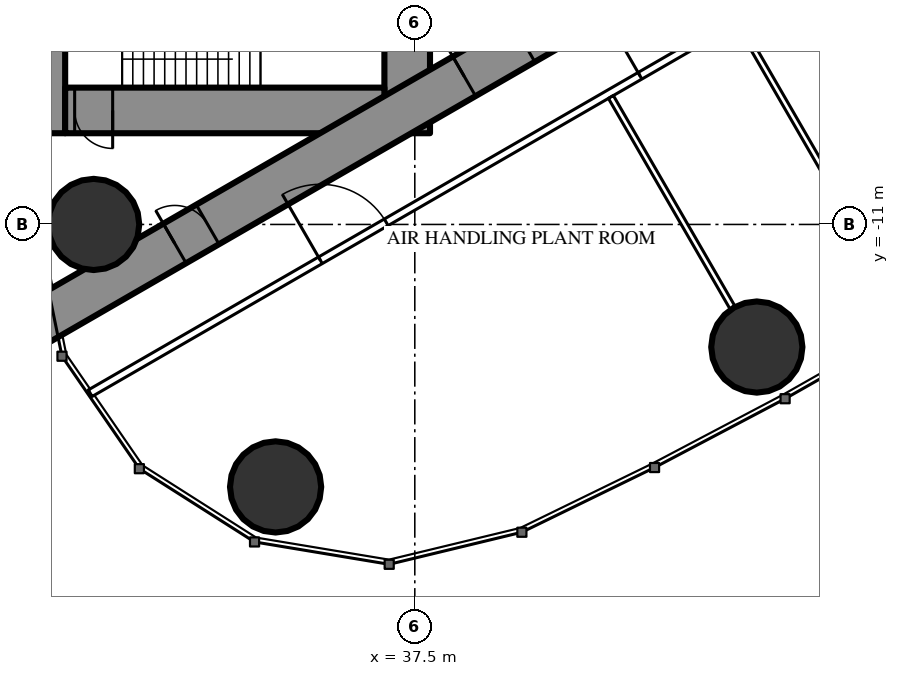
"""IFC4 building model, lengths in metres.
Left out: names, types, materials, properties, quantities, classifications, styles, units other than length and angle.
Written with IfcOpenShell. Run it as: python <this file> out.ifc"""

import sys

from ifc_helpers import new_model, si_unit, direction, frame, frame_2d, origin, origin_2d, place, context, subcontext, project, spatial, rectangle, circle, extrude, element, fill, save


model = new_model("IFC4")
c1 = context("Model", 3, precision=1e-05, world=origin(), true_north=direction((0.0, 1.0)))
c2 = subcontext(c1, "Body", "Model", "MODEL_VIEW")
j1 = project(units=[si_unit("LENGTHUNIT", "METRE"), si_unit("PLANEANGLEUNIT", "RADIAN")], contexts=[c1])
p1 = place(None, origin())
s1 = spatial("IfcSite", under=j1, at=p1, CompositionType="ELEMENT")
p2 = place(p1, origin())
s2 = spatial("IfcBuilding", under=s1, at=p2, CompositionType="ELEMENT")
p3 = place(p2, frame((0.0, 0.0, 263.3)))
s3 = spatial("IfcBuildingStorey", under=s2, at=p3, CompositionType="ELEMENT", Elevation=263.3)
for number, where, z_axis, x_axis in (
    (1, (33.837, -17.906, 0.0), (0.0, 0.0, 1.0), (1.0, 0.0, 0.0)),
    (2, (29.05, -11.0, 0.0), (0.0, 0.0, 1.0), (1.0, 0.0, 0.0)),
    (3, (46.499, -14.226, 0.0), (0.0, 0.0, 1.0), (1.0, 0.0, 0.0)),
):
    element("IfcColumn", number, at=place(p3, frame(where, z_axis=z_axis, x_axis=x_axis)), inside=s3, PredefinedType="COLUMN", context=c2, shape_type="SweptSolid", body=[
        extrude(circle(Radius=1.2, at=origin_2d()), origin(), (0.0, 0.0, 1.0), 5.0),
    ])
p4 = place(p3, frame((27.9, -8.6, 0.0), z_axis=(0.0, 0.0, 1.0), x_axis=(0.0, 1.0, 0.0)))
e4 = element("IfcWall", 4, at=p4, inside=s3, PredefinedType="SHEAR", context=c2, shape_type="SweptSolid", body=[
    extrude(rectangle(XDim=17.2, YDim=0.8, at=frame_2d((8.6, 0.0))), origin(), (0.0, 0.0, 1.0), 5.0),
])
p5 = place(p4, frame((9.35, 0.0, 0.0)))
e5 = element("IfcOpeningElement", 5, at=p5, cuts=e4, PredefinedType="OPENING", context=c2, shape_type="SweptSolid", body=[
    extrude(rectangle(XDim=0.9, YDim=2.2, at=frame_2d((0.45, 1.1))), frame((0.0, 0.41, 0.0), z_axis=(0.0, -1.0, 0.0), x_axis=(1.0, 0.0, 0.0)), (0.0, 0.0, 1.0), 0.82),
])
p6 = place(p3, frame((37.3, -8.6, 0.0), z_axis=(0.0, 0.0, 1.0), x_axis=(0.0, 1.0, 0.0)))
e6 = element("IfcWall", 6, at=p6, inside=s3, PredefinedType="SHEAR", context=c2, shape_type="SweptSolid", body=[
    extrude(rectangle(XDim=17.2, YDim=1.2, at=frame_2d((8.6, 0.0))), origin(), (0.0, 0.0, 1.0), 5.0),
])
p7 = place(p6, frame((7.7, 0.0, 0.0)))
e7 = element("IfcOpeningElement", 7, at=p7, cuts=e6, PredefinedType="OPENING", context=c2, shape_type="SweptSolid", body=[
    extrude(rectangle(XDim=1.8, YDim=2.2, at=frame_2d((0.9, 1.1))), frame((0.0, 0.61, 0.0), z_axis=(0.0, -1.0, 0.0), x_axis=(1.0, 0.0, 0.0)), (0.0, 0.0, 1.0), 1.22),
])
p8 = place(p3, frame((28.3, -8.0, 0.0), z_axis=(0.0, 0.0, 1.0), x_axis=(1.0, 0.0, 0.0)))
e8 = element("IfcWall", 8, at=p8, inside=s3, PredefinedType="SHEAR", context=c2, shape_type="SweptSolid", body=[
    extrude(rectangle(XDim=8.4, YDim=1.2, at=frame_2d((4.2, 0.0))), origin(), (0.0, 0.0, 1.0), 5.0),
])
p9 = place(p8, frame((0.25, 0.0, 0.0)))
e9 = element("IfcOpeningElement", 9, at=p9, cuts=e8, PredefinedType="OPENING", context=c2, shape_type="SweptSolid", body=[
    extrude(rectangle(XDim=1.0, YDim=2.2, at=frame_2d((0.5, 1.1))), frame((0.0, 0.61, 0.0), z_axis=(0.0, -1.0, 0.0), x_axis=(1.0, 0.0, 0.0)), (0.0, 0.0, 1.0), 1.22),
])
p10 = place(p3, frame((27.2, -13.8, 0.0), z_axis=(0.0, 0.0, 1.0), x_axis=(0.866027159892, 0.499996958321, 0.0)))
e10 = element("IfcWall", 10, at=p10, inside=s3, PredefinedType="SHEAR", context=c2, shape_type="SweptSolid", body=[
    extrude(rectangle(XDim=27.947, YDim=1.2, at=frame_2d((13.973, 0.0))), origin(), (0.0, 0.0, 1.0), 5.0),
])
p11 = place(p10, frame((4.6, 0.0, 0.0)))
e11 = element("IfcOpeningElement", 11, at=p11, cuts=e10, PredefinedType="OPENING", context=c2, shape_type="SweptSolid", body=[
    extrude(rectangle(XDim=1.0, YDim=2.2, at=frame_2d((0.5, 1.1))), frame((0.0, 0.61, 0.0), z_axis=(0.0, -1.0, 0.0), x_axis=(1.0, 0.0, 0.0)), (0.0, 0.0, 1.0), 1.22),
])
p12 = place(p10, frame((13.395, 0.0, 0.0)))
e12 = element("IfcOpeningElement", 12, at=p12, cuts=e10, PredefinedType="OPENING", context=c2, shape_type="SweptSolid", body=[
    extrude(rectangle(XDim=1.8, YDim=2.2, at=frame_2d((0.9, 1.1))), frame((0.0, 0.61, 0.0), z_axis=(0.0, -1.0, 0.0), x_axis=(1.0, 0.0, 0.0)), (0.0, 0.0, 1.0), 1.22),
])
p13 = place(p3, frame((28.959, -15.44, 0.0), z_axis=(0.0, 0.0, 1.0), x_axis=(0.866025227435, 0.500000305447, 0.0)))
e13 = element("IfcWall", 13, at=p13, inside=s3, PredefinedType="PARTITIONING", context=c2, shape_type="SweptSolid", body=[
    extrude(rectangle(XDim=30.88, YDim=0.2, at=frame_2d((15.44, 0.0))), origin(), (0.0, 0.0, 1.0), 4.75),
])
p14 = place(p13, frame((6.994, 0.0, 0.0)))
e14 = element("IfcOpeningElement", 14, at=p14, cuts=e13, PredefinedType="OPENING", context=c2, shape_type="SweptSolid", body=[
    extrude(rectangle(XDim=2.0, YDim=2.4, at=frame_2d((1.0, 1.2))), frame((0.0, 0.11, 0.0), z_axis=(0.0, -1.0, 0.0), x_axis=(1.0, 0.0, 0.0)), (0.0, 0.0, 1.0), 0.22),
])
p15 = place(p13, frame((16.704, 0.0, 0.0)))
e15 = element("IfcOpeningElement", 15, at=p15, cuts=e13, PredefinedType="OPENING", context=c2, shape_type="SweptSolid", body=[
    extrude(rectangle(XDim=2.0, YDim=2.4, at=frame_2d((1.0, 1.2))), frame((0.0, 0.11, 0.0), z_axis=(0.0, -1.0, 0.0), x_axis=(1.0, 0.0, 0.0)), (0.0, 0.0, 1.0), 0.22),
])
p16 = place(p13, frame((20.587, 0.0, 0.0)))
e16 = element("IfcOpeningElement", 16, at=p16, cuts=e13, PredefinedType="OPENING", context=c2, shape_type="SweptSolid", body=[
    extrude(rectangle(XDim=2.0, YDim=2.4, at=frame_2d((1.0, 1.2))), frame((0.0, 0.11, 0.0), z_axis=(0.0, -1.0, 0.0), x_axis=(1.0, 0.0, 0.0)), (0.0, 0.0, 1.0), 0.22),
])
p17 = place(p13, frame((26.092, 0.0, 0.0)))
e17 = element("IfcOpeningElement", 17, at=p17, cuts=e13, PredefinedType="OPENING", context=c2, shape_type="SweptSolid", body=[
    extrude(rectangle(XDim=2.0, YDim=2.4, at=frame_2d((1.0, 1.2))), frame((0.0, 0.11, 0.0), z_axis=(0.0, -1.0, 0.0), x_axis=(1.0, 0.0, 0.0)), (0.0, 0.0, 1.0), 0.22),
])
p18 = place(p3, frame((42.66, -7.646, 0.0), z_axis=(0.0, 0.0, 1.0), x_axis=(0.499996592859, -0.866027370889, 0.0)))
e18 = element("IfcWall", 18, at=p18, inside=s3, PredefinedType="PARTITIONING", context=c2, shape_type="SweptSolid", body=[
    extrude(rectangle(XDim=6.398, YDim=0.15, at=frame_2d((3.199, 0.0))), origin(), (0.0, 0.0, 1.0), 3.85),
])
p19 = place(p3, frame((46.023, -5.704, 0.0), z_axis=(0.0, 0.0, 1.0), x_axis=(0.499984478165, -0.866034365135, 0.0)))
e19 = element("IfcWall", 19, at=p19, inside=s3, PredefinedType="PARTITIONING", context=c2, shape_type="SweptSolid", body=[
    extrude(rectangle(XDim=6.426, YDim=0.15, at=frame_2d((3.213, 0.0))), origin(), (0.0, 0.0, 1.0), 3.85),
])
p20 = place(p14, origin())
e20 = element("IfcDoor", 20, at=p20, inside=s3, OperationType="DOUBLE_DOOR_SINGLE_SWING", PredefinedType="DOOR", context=c2, shape_type="SweptSolid", body=[
    extrude(rectangle(XDim=2.0, YDim=2.4, at=frame_2d((1.0, 1.2))), frame((0.0, 0.025, 0.0), z_axis=(0.0, -1.0, 0.0), x_axis=(1.0, 0.0, 0.0)), (0.0, 0.0, 1.0), 0.05),
])
fill(e14, e20)
p21 = place(p15, origin())
e21 = element("IfcDoor", 21, at=p21, inside=s3, OperationType="DOUBLE_DOOR_SINGLE_SWING", PredefinedType="DOOR", context=c2, shape_type="SweptSolid", body=[
    extrude(rectangle(XDim=2.0, YDim=2.4, at=frame_2d((1.0, 1.2))), frame((0.0, 0.025, 0.0), z_axis=(0.0, -1.0, 0.0), x_axis=(1.0, 0.0, 0.0)), (0.0, 0.0, 1.0), 0.05),
])
fill(e15, e21)
p22 = place(p11, origin())
e22 = element("IfcDoor", 22, at=p22, inside=s3, OperationType="SINGLE_SWING_LEFT", PredefinedType="DOOR", context=c2, shape_type="SweptSolid", body=[
    extrude(rectangle(XDim=1.0, YDim=2.2, at=frame_2d((0.5, 1.1))), frame((0.0, 0.025, 0.0), z_axis=(0.0, -1.0, 0.0), x_axis=(1.0, 0.0, 0.0)), (0.0, 0.0, 1.0), 0.05),
])
fill(e11, e22)
p23 = place(p12, origin())
e23 = element("IfcDoor", 23, at=p23, inside=s3, OperationType="DOUBLE_DOOR_SINGLE_SWING", PredefinedType="DOOR", context=c2, shape_type="SweptSolid", body=[
    extrude(rectangle(XDim=1.8, YDim=2.2, at=frame_2d((0.9, 1.1))), frame((0.0, 0.025, 0.0), z_axis=(0.0, -1.0, 0.0), x_axis=(1.0, 0.0, 0.0)), (0.0, 0.0, 1.0), 0.05),
])
fill(e12, e23)
p24 = place(p9, origin())
e24 = element("IfcDoor", 24, at=p24, inside=s3, OperationType="SINGLE_SWING_RIGHT", PredefinedType="DOOR", context=c2, shape_type="SweptSolid", body=[
    extrude(rectangle(XDim=1.0, YDim=2.2, at=frame_2d((0.5, 1.1))), frame((0.0, 0.025, 0.0), z_axis=(0.0, -1.0, 0.0), x_axis=(1.0, 0.0, 0.0)), (0.0, 0.0, 1.0), 0.05),
])
fill(e9, e24)
save(model, sys.argv[1])
